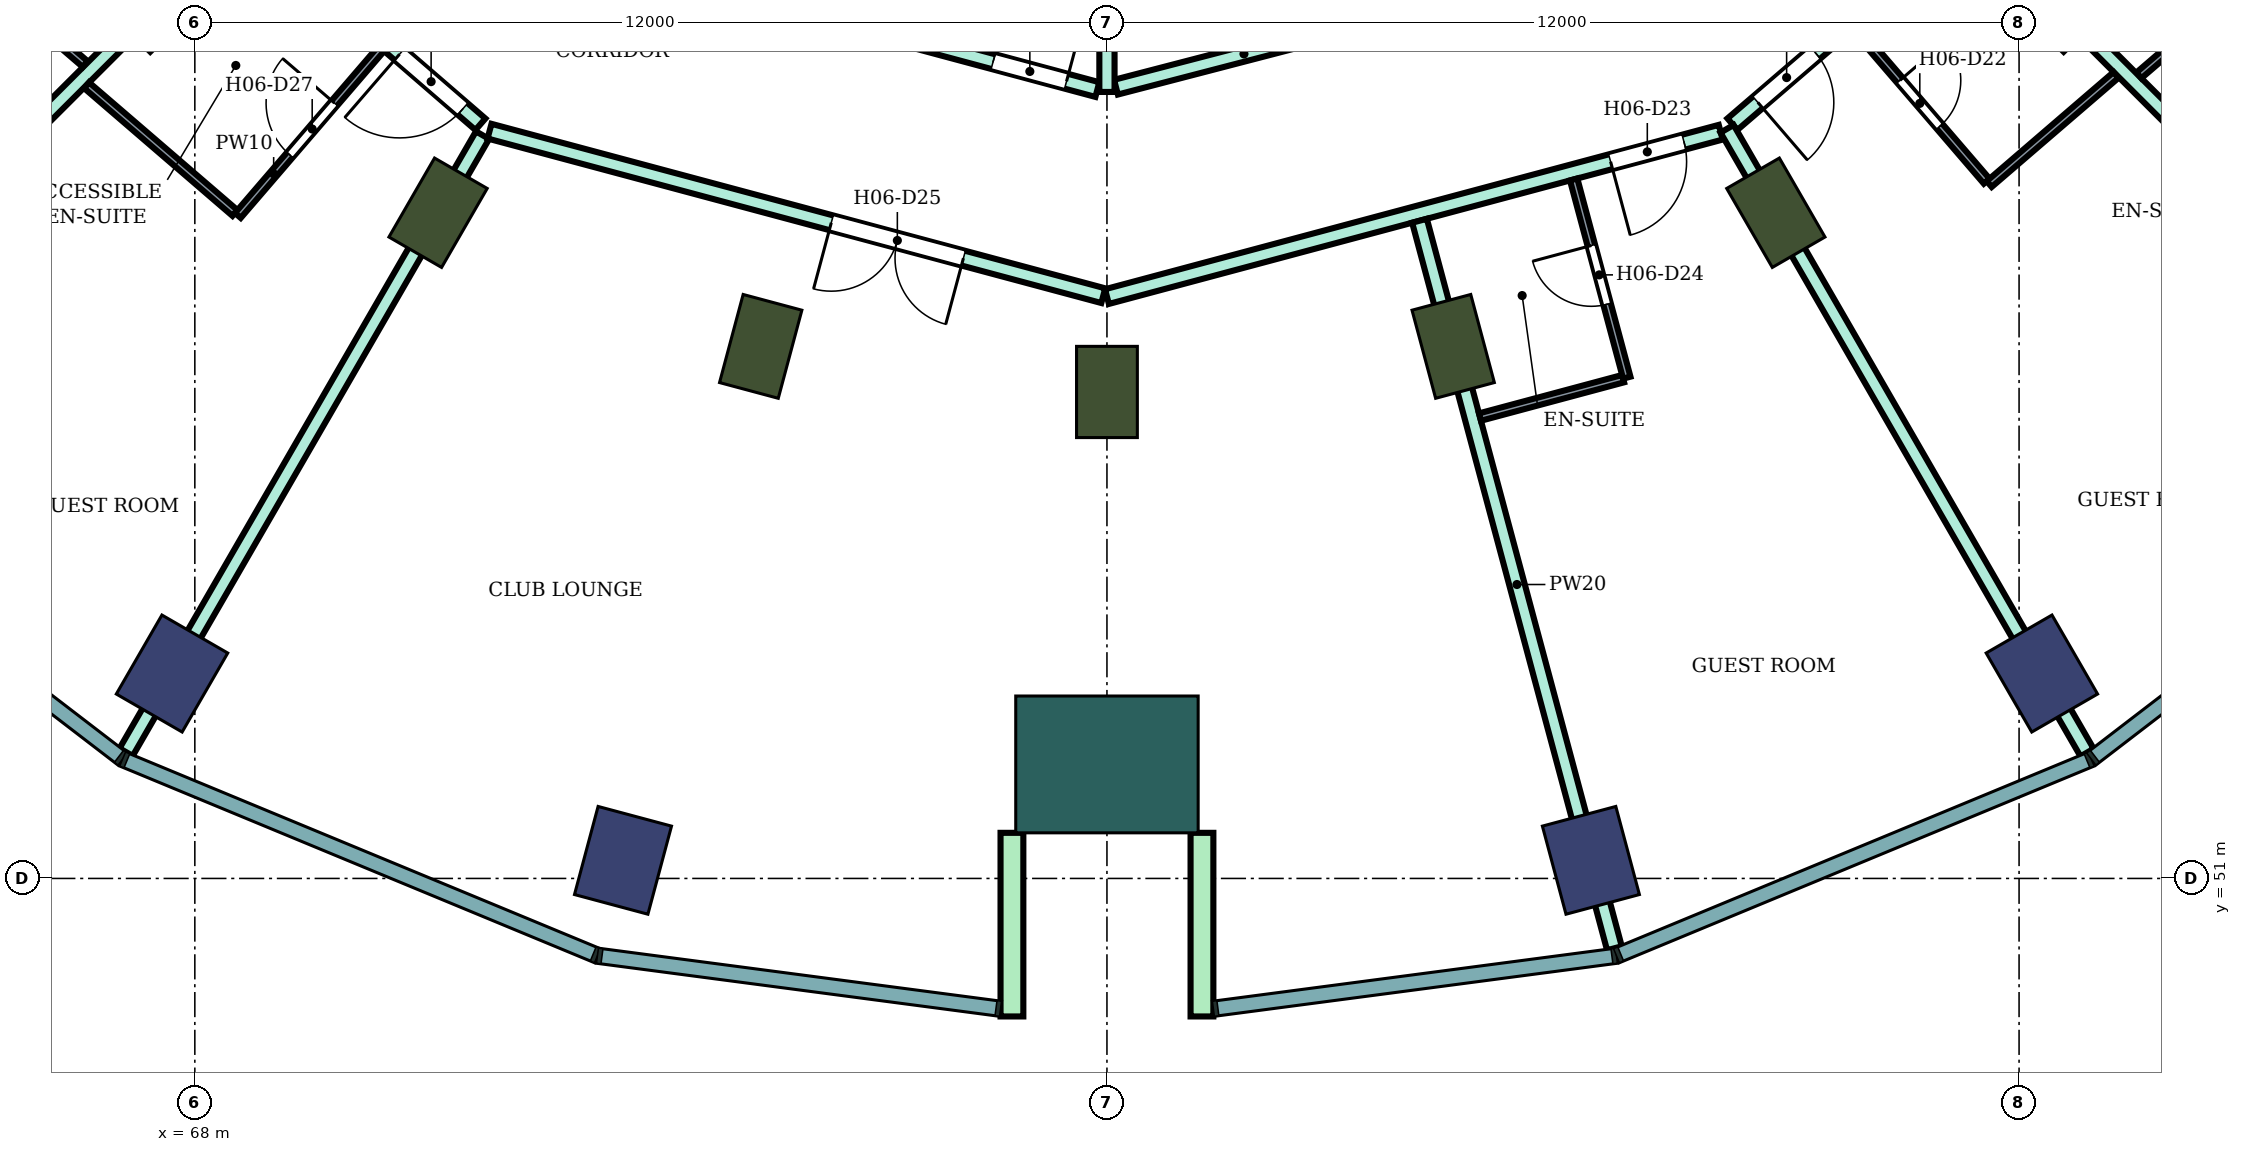
"""IFC4 building model, lengths in metres.
Left out: names, types, materials, properties, quantities, classifications, styles, units other than length and angle.
Written with IfcOpenShell. Run it as: python <this file> out.ifc"""

import sys

from ifc_helpers import new_model, si_unit, direction, frame, frame_2d, origin, origin_2d, place, context, subcontext, project, spatial, rectangle, extrude, element, fill, save


model = new_model("IFC4")
c1 = context("Model", 3, precision=1e-05, world=origin(), true_north=direction((0.0, 1.0)))
c2 = subcontext(c1, "Body", "Model", "MODEL_VIEW")
j1 = project(units=[si_unit("LENGTHUNIT", "METRE"), si_unit("PLANEANGLEUNIT", "RADIAN")], contexts=[c1])
p1 = place(None, origin())
s1 = spatial("IfcSite", under=j1, at=p1, CompositionType="ELEMENT")
p2 = place(p1, origin())
s2 = spatial("IfcBuilding", under=s1, at=p2, CompositionType="ELEMENT")
p3 = place(p2, frame((0.0, 0.0, 101.4)))
s3 = spatial("IfcBuildingStorey", under=s2, at=p3, CompositionType="ELEMENT", Elevation=101.4)
for number, where, z_axis, x_axis in (
    (1, (67.7, 53.696, 0.0), (0.0, 0.0, 1.0), (-0.5, -0.866, 0.0)),
    (2, (73.633, 51.238, 0.0), (0.0, 0.0, 1.0), (-0.259, -0.966, 0.0)),
    (3, (86.367, 51.238, 0.0), (0.0, 0.0, 1.0), (0.259, -0.966, 0.0)),
    (4, (92.3, 53.696, 0.0), (0.0, 0.0, 1.0), (0.5, -0.866, 0.0)),
):
    element("IfcColumn", number, at=place(p3, frame(where, z_axis=z_axis, x_axis=x_axis)), inside=s3, PredefinedType="COLUMN", context=c2, shape_type="SweptSolid", body=[
        extrude(rectangle(XDim=1.2, YDim=1.0, at=origin_2d()), origin(), (0.0, 0.0, 1.0), 3.8),
    ])
for number, where, z_axis, x_axis in (
    (5, (67.555, 62.555, 0.0), (0.0, 0.0, 1.0), (-0.707, -0.707, 0.0)),
    (6, (71.2, 59.758, 0.0), (0.0, 0.0, 1.0), (-0.5, -0.866, 0.0)),
    (7, (75.445, 58.0, 0.0), (0.0, 0.0, 1.0), (-0.259, -0.966, 0.0)),
    (8, (80.0, 57.4, 0.0), (0.0, 0.0, 1.0), (0.0, -1.0, 0.0)),
    (9, (84.555, 58.0, 0.0), (0.0, 0.0, 1.0), (0.259, -0.966, 0.0)),
    (10, (88.8, 59.758, 0.0), (0.0, 0.0, 1.0), (0.5, -0.866, 0.0)),
    (11, (92.445, 62.555, 0.0), (0.0, 0.0, 1.0), (0.707, -0.707, 0.0)),
):
    element("IfcColumn", number, at=place(p3, frame(where, z_axis=z_axis, x_axis=x_axis)), inside=s3, PredefinedType="COLUMN", context=c2, shape_type="SweptSolid", body=[
        extrude(rectangle(XDim=1.2, YDim=0.8, at=origin_2d()), origin(), (0.0, 0.0, 1.0), 3.8),
    ])
p4 = place(p3, frame((80.0, 52.5, 0.0), z_axis=(0.0, 0.0, 1.0), x_axis=(0.0, -1.0, 0.0)))
e12 = element("IfcColumn", 12, at=p4, inside=s3, PredefinedType="COLUMN", context=c2, shape_type="SweptSolid", body=[
    extrude(rectangle(XDim=1.8, YDim=2.4, at=origin_2d()), origin(), (0.0, 0.0, 1.0), 3.8),
])
for number, where, z_axis, x_axis in (
    (13, (78.75, 51.6, 0.0), (0.0, 0.0, 1.0), (0.0, -1.0, 0.0)),
    (14, (81.25, 51.6, 0.0), (0.0, 0.0, 1.0), (0.0, -1.0, 0.0)),
):
    element("IfcWall", number, at=place(p3, frame(where, z_axis=z_axis, x_axis=x_axis)), inside=s3, PredefinedType="NOTDEFINED", context=c2, shape_type="SweptSolid", body=[
        extrude(rectangle(XDim=2.416, YDim=0.3, at=frame_2d((1.208, 0.0))), origin(), (0.0, 0.0, 1.0), 3.8),
    ])
p5 = place(p3, frame((63.594, 58.598, 0.0), z_axis=(0.0, 0.0, 1.0), x_axis=(0.707228748718, 0.706984792613, 0.0)))
e15 = element("IfcWall", 15, at=p5, inside=s3, PredefinedType="PARTITIONING", context=c2, shape_type="SweptSolid", body=[
    extrude(rectangle(XDim=7.005, YDim=0.2, at=frame_2d((3.503, 0.0))), origin(), (0.0, 0.0, 1.0), 3.35),
])
p6 = place(p3, frame((67.079, 64.968, 0.0), z_axis=(0.0, 0.0, 1.0), x_axis=(0.756371089567, -0.654142778656, 0.0)))
e16 = element("IfcWall", 16, at=p6, inside=s3, PredefinedType="PARTITIONING", context=c2, shape_type="SweptSolid", body=[
    extrude(rectangle(XDim=6.185, YDim=0.2, at=frame_2d((3.093, 0.0))), origin(), (0.0, 0.0, 1.0), 3.35),
])
p7 = place(p6, frame((4.778, 0.0, 0.0)))
e17 = element("IfcOpeningElement", 17, at=p7, cuts=e16, PredefinedType="OPENING", context=c2, shape_type="SweptSolid", body=[
    extrude(rectangle(XDim=1.1, YDim=2.1, at=frame_2d((0.55, 1.05))), frame((0.0, 0.11, 0.0), z_axis=(0.0, -1.0, 0.0), x_axis=(1.0, 0.0, 0.0)), (0.0, 0.0, 1.0), 0.22),
])
p8 = place(p3, frame((67.096, 52.662, 0.0), z_axis=(0.0, 0.0, 1.0), x_axis=(0.500222922337, 0.865896661253, 0.0)))
e18 = element("IfcWall", 18, at=p8, inside=s3, PredefinedType="PARTITIONING", context=c2, shape_type="SweptSolid", body=[
    extrude(rectangle(XDim=9.374, YDim=0.2, at=frame_2d((4.687, 0.0))), origin(), (0.0, 0.0, 1.0), 3.35),
])
p9 = place(p3, frame((71.877, 60.831, 0.0), z_axis=(0.0, 0.0, 1.0), x_axis=(0.965905026676, -0.258896657842, 0.0)))
e19 = element("IfcWall", 19, at=p9, inside=s3, PredefinedType="PARTITIONING", context=c2, shape_type="SweptSolid", body=[
    extrude(rectangle(XDim=8.36, YDim=0.2, at=frame_2d((4.18, 0.0))), origin(), (0.0, 0.0, 1.0), 3.35),
])
p10 = place(p9, frame((4.655, 0.0, 0.0)))
e20 = element("IfcOpeningElement", 20, at=p10, cuts=e19, PredefinedType="OPENING", context=c2, shape_type="SweptSolid", body=[
    extrude(rectangle(XDim=1.8, YDim=2.1, at=frame_2d((0.9, 1.05))), frame((0.0, 0.11, 0.0), z_axis=(0.0, -1.0, 0.0), x_axis=(1.0, 0.0, 0.0)), (0.0, 0.0, 1.0), 0.22),
])
p11 = place(p3, frame((73.297, 63.143, 0.0), z_axis=(0.0, 0.0, 1.0), x_axis=(0.965859030528, -0.25906820173, 0.0)))
e21 = element("IfcWall", 21, at=p11, inside=s3, PredefinedType="PARTITIONING", context=c2, shape_type="SweptSolid", body=[
    extrude(rectangle(XDim=6.81, YDim=0.2, at=frame_2d((3.405, 0.0))), origin(), (0.0, 0.0, 1.0), 3.35),
])
p12 = place(p11, frame((5.39, 0.0, 0.0)))
e22 = element("IfcOpeningElement", 22, at=p12, cuts=e21, PredefinedType="OPENING", context=c2, shape_type="SweptSolid", body=[
    extrude(rectangle(XDim=1.0, YDim=2.1, at=frame_2d((0.5, 1.05))), frame((0.0, 0.11, 0.0), z_axis=(0.0, -1.0, 0.0), x_axis=(1.0, 0.0, 0.0)), (0.0, 0.0, 1.0), 0.22),
])
p13 = place(p3, frame((80.119, 61.41, 0.0), z_axis=(0.0, 0.0, 1.0), x_axis=(0.967823361235, 0.251630565408, 0.0)))
e23 = element("IfcWall", 23, at=p13, inside=s3, PredefinedType="PARTITIONING", context=c2, shape_type="SweptSolid", body=[
    extrude(rectangle(XDim=6.958, YDim=0.2, at=frame_2d((3.479, 0.0))), origin(), (0.0, 0.0, 1.0), 3.35),
])
p14 = place(p13, frame((2.529, 0.0, 0.0)))
e24 = element("IfcOpeningElement", 24, at=p14, cuts=e23, PredefinedType="OPENING", context=c2, shape_type="SweptSolid", body=[
    extrude(rectangle(XDim=1.8, YDim=2.1, at=frame_2d((0.9, 1.05))), frame((0.0, 0.11, 0.0), z_axis=(0.0, -1.0, 0.0), x_axis=(1.0, 0.0, 0.0)), (0.0, 0.0, 1.0), 0.22),
])
p15 = place(p3, frame((80.0, 58.655, 0.0), z_axis=(0.0, 0.0, 1.0), x_axis=(0.965967338894, 0.258664068224, 0.0)))
e25 = element("IfcWall", 25, at=p15, inside=s3, PredefinedType="PARTITIONING", context=c2, shape_type="SweptSolid", body=[
    extrude(rectangle(XDim=8.36, YDim=0.2, at=frame_2d((4.18, 0.0))), origin(), (0.0, 0.0, 1.0), 3.35),
])
p16 = place(p15, frame((6.86, 0.0, 0.0)))
e26 = element("IfcOpeningElement", 26, at=p16, cuts=e25, PredefinedType="OPENING", context=c2, shape_type="SweptSolid", body=[
    extrude(rectangle(XDim=1.0, YDim=2.1, at=frame_2d((0.5, 1.05))), frame((0.0, 0.11, 0.0), z_axis=(0.0, -1.0, 0.0), x_axis=(1.0, 0.0, 0.0)), (0.0, 0.0, 1.0), 0.22),
])
p17 = place(p3, frame((80.0, 61.347, 0.0), z_axis=(0.0, 0.0, 1.0), x_axis=(0.0, 1.0, 0.0)))
e27 = element("IfcWall", 27, at=p17, inside=s3, PredefinedType="PARTITIONING", context=c2, shape_type="SweptSolid", body=[
    extrude(rectangle(XDim=5.953, YDim=0.2, at=frame_2d((2.977, 0.0))), origin(), (0.0, 0.0, 1.0), 3.35),
])
p18 = place(p3, frame((84.112, 59.652, 0.0), z_axis=(0.0, 0.0, 1.0), x_axis=(0.258792739659, -0.965932874428, 0.0)))
e28 = element("IfcWall", 28, at=p18, inside=s3, PredefinedType="PARTITIONING", context=c2, shape_type="SweptSolid", body=[
    extrude(rectangle(XDim=9.908, YDim=0.2, at=frame_2d((4.954, 0.0))), origin(), (0.0, 0.0, 1.0), 3.35),
])
p19 = place(p3, frame((88.229, 60.923, 0.0), z_axis=(0.0, 0.0, 1.0), x_axis=(0.758220952094, 0.651997690031, 0.0)))
e29 = element("IfcWall", 29, at=p19, inside=s3, PredefinedType="PARTITIONING", context=c2, shape_type="SweptSolid", body=[
    extrude(rectangle(XDim=6.346, YDim=0.2, at=frame_2d((3.173, 0.0))), origin(), (0.0, 0.0, 1.0), 3.35),
])
p20 = place(p19, frame((4.767, 0.0, 0.0)))
e30 = element("IfcOpeningElement", 30, at=p20, cuts=e29, PredefinedType="OPENING", context=c2, shape_type="SweptSolid", body=[
    extrude(rectangle(XDim=1.0, YDim=2.1, at=frame_2d((0.5, 1.05))), frame((0.0, 0.11, 0.0), z_axis=(0.0, -1.0, 0.0), x_axis=(1.0, 0.0, 0.0)), (0.0, 0.0, 1.0), 0.22),
])
p21 = place(p19, frame((0.44, 0.0, 0.0)))
e31 = element("IfcOpeningElement", 31, at=p21, cuts=e29, PredefinedType="OPENING", context=c2, shape_type="SweptSolid", body=[
    extrude(rectangle(XDim=1.0, YDim=2.1, at=frame_2d((0.5, 1.05))), frame((0.0, 0.11, 0.0), z_axis=(0.0, -1.0, 0.0), x_axis=(1.0, 0.0, 0.0)), (0.0, 0.0, 1.0), 0.22),
])
p22 = place(p3, frame((88.158, 60.862, 0.0), z_axis=(0.0, 0.0, 1.0), x_axis=(0.499916512745, -0.866073599808, 0.0)))
e32 = element("IfcWall", 32, at=p22, inside=s3, PredefinedType="PARTITIONING", context=c2, shape_type="SweptSolid", body=[
    extrude(rectangle(XDim=9.475, YDim=0.2, at=frame_2d((4.737, 0.0))), origin(), (0.0, 0.0, 1.0), 3.35),
])
p23 = place(p3, frame((91.448, 63.547, 0.0), z_axis=(0.0, 0.0, 1.0), x_axis=(0.706949958062, -0.707263569538, 0.0)))
e33 = element("IfcWall", 33, at=p23, inside=s3, PredefinedType="PARTITIONING", context=c2, shape_type="SweptSolid", body=[
    extrude(rectangle(XDim=7.006, YDim=0.2, at=frame_2d((3.503, 0.0))), origin(), (0.0, 0.0, 1.0), 3.35),
])
p24 = place(p3, frame((65.246, 62.842, 0.0), z_axis=(0.0, 0.0, 1.0), x_axis=(0.758030338995, -0.652219292234, 0.0)))
e34 = element("IfcWall", 34, at=p24, inside=s3, PredefinedType="PARTITIONING", context=c2, shape_type="SweptSolid", body=[
    extrude(rectangle(XDim=1.73, YDim=0.1, at=frame_2d((0.865, 0.0))), origin(), (0.0, 0.0, 1.0), 3.35),
])
p25 = place(p3, frame((66.576, 61.435, 0.0), z_axis=(0.0, 0.0, 1.0), x_axis=(0.757970550281, -0.652288774169, 0.0)))
e35 = element("IfcWall", 35, at=p25, inside=s3, PredefinedType="PARTITIONING", context=c2, shape_type="SweptSolid", body=[
    extrude(rectangle(XDim=2.576, YDim=0.1, at=frame_2d((1.288, 0.0))), origin(), (0.0, 0.0, 1.0), 3.35),
])
p26 = place(p3, frame((68.566, 59.722, 0.0), z_axis=(0.0, 0.0, 1.0), x_axis=(0.65193146671, 0.758277892803, 0.0)))
e36 = element("IfcWall", 36, at=p26, inside=s3, PredefinedType="PARTITIONING", context=c2, shape_type="SweptSolid", body=[
    extrude(rectangle(XDim=2.89, YDim=0.1, at=frame_2d((1.445, 0.0))), origin(), (0.0, 0.0, 1.0), 3.35),
])
p27 = place(p26, frame((1.05, 0.0, 0.0)))
e37 = element("IfcOpeningElement", 37, at=p27, cuts=e36, PredefinedType="OPENING", context=c2, shape_type="SweptSolid", body=[
    extrude(rectangle(XDim=0.9, YDim=2.1, at=frame_2d((0.45, 1.05))), frame((0.0, 0.06, 0.0), z_axis=(0.0, -1.0, 0.0), x_axis=(1.0, 0.0, 0.0)), (0.0, 0.0, 1.0), 0.12),
])
p28 = place(p3, frame((84.908, 57.07, 0.0), z_axis=(0.0, 0.0, 1.0), x_axis=(0.965853538138, 0.25908867761, 0.0)))
e38 = element("IfcWall", 38, at=p28, inside=s3, PredefinedType="PARTITIONING", context=c2, shape_type="SweptSolid", body=[
    extrude(rectangle(XDim=1.95, YDim=0.1, at=frame_2d((0.975, 0.0))), origin(), (0.0, 0.0, 1.0), 3.35),
])
p29 = place(p3, frame((86.14, 60.196, 0.0), z_axis=(0.0, 0.0, 1.0), x_axis=(0.258945475746, -0.965891940432, 0.0)))
e39 = element("IfcWall", 39, at=p29, inside=s3, PredefinedType="PARTITIONING", context=c2, shape_type="SweptSolid", body=[
    extrude(rectangle(XDim=2.7, YDim=0.1, at=frame_2d((1.35, 0.0))), origin(), (0.0, 0.0, 1.0), 3.35),
])
p30 = place(p29, frame((0.9, 0.0, 0.0)))
e40 = element("IfcOpeningElement", 40, at=p30, cuts=e39, PredefinedType="OPENING", context=c2, shape_type="SweptSolid", body=[
    extrude(rectangle(XDim=0.8, YDim=2.1, at=frame_2d((0.4, 1.05))), frame((0.0, 0.06, 0.0), z_axis=(0.0, -1.0, 0.0), x_axis=(1.0, 0.0, 0.0)), (0.0, 0.0, 1.0), 0.12),
])
p31 = place(p3, frame((89.846, 62.182, 0.0), z_axis=(0.0, 0.0, 1.0), x_axis=(0.652095405055, -0.758136915541, 0.0)))
e41 = element("IfcWall", 41, at=p31, inside=s3, PredefinedType="PARTITIONING", context=c2, shape_type="SweptSolid", body=[
    extrude(rectangle(XDim=2.65, YDim=0.1, at=frame_2d((1.325, 0.0))), origin(), (0.0, 0.0, 1.0), 3.35),
])
p32 = place(p31, frame((0.9, 0.0, 0.0)))
e42 = element("IfcOpeningElement", 42, at=p32, cuts=e41, PredefinedType="OPENING", context=c2, shape_type="SweptSolid", body=[
    extrude(rectangle(XDim=0.8, YDim=2.1, at=frame_2d((0.4, 1.05))), frame((0.0, 0.06, 0.0), z_axis=(0.0, -1.0, 0.0), x_axis=(1.0, 0.0, 0.0)), (0.0, 0.0, 1.0), 0.12),
])
p33 = place(p3, frame((91.607, 60.135, 0.0), z_axis=(0.0, 0.0, 1.0), x_axis=(0.758135842672, 0.652096652388, 0.0)))
e43 = element("IfcWall", 43, at=p33, inside=s3, PredefinedType="PARTITIONING", context=c2, shape_type="SweptSolid", body=[
    extrude(rectangle(XDim=2.201, YDim=0.1, at=frame_2d((1.101, 0.0))), origin(), (0.0, 0.0, 1.0), 3.35),
])
p34 = place(p3, frame((93.577, 61.565, 0.0), z_axis=(0.0, 0.0, 1.0), x_axis=(0.75812140399, 0.652113438607, 0.0)))
e44 = element("IfcWall", 44, at=p34, inside=s3, PredefinedType="PARTITIONING", context=c2, shape_type="SweptSolid", body=[
    extrude(rectangle(XDim=7.72, YDim=0.1, at=frame_2d((3.86, 0.0))), origin(), (0.0, 0.0, 1.0), 3.35),
])
p35 = place(p34, frame((4.35, 0.0, 0.0)))
e45 = element("IfcOpeningElement", 45, at=p35, cuts=e44, PredefinedType="OPENING", context=c2, shape_type="SweptSolid", body=[
    extrude(rectangle(XDim=0.9, YDim=2.1, at=frame_2d((0.45, 1.05))), frame((0.0, 0.06, 0.0), z_axis=(0.0, -1.0, 0.0), x_axis=(1.0, 0.0, 0.0)), (0.0, 0.0, 1.0), 0.12),
])
p36 = place(p21, frame((1.0, 0.0, 0.0), z_axis=(0.0, 0.0, 1.0), x_axis=(-1.0, 0.0, 0.0)))
e46 = element("IfcDoor", 46, at=p36, inside=s3, OperationType="SINGLE_SWING_RIGHT", PredefinedType="DOOR", context=c2, shape_type="SweptSolid", body=[
    extrude(rectangle(XDim=1.0, YDim=2.1, at=frame_2d((0.5, 1.05))), frame((0.0, 0.025, 0.0), z_axis=(0.0, -1.0, 0.0), x_axis=(1.0, 0.0, 0.0)), (0.0, 0.0, 1.0), 0.05),
])
fill(e31, e46)
p37 = place(p32, origin())
e47 = element("IfcDoor", 47, at=p37, inside=s3, OperationType="SINGLE_SWING_LEFT", PredefinedType="DOOR", context=c2, shape_type="SweptSolid", body=[
    extrude(rectangle(XDim=0.8, YDim=2.1, at=frame_2d((0.4, 1.05))), frame((0.0, 0.025, 0.0), z_axis=(0.0, -1.0, 0.0), x_axis=(1.0, 0.0, 0.0)), (0.0, 0.0, 1.0), 0.05),
])
fill(e42, e47)
p38 = place(p16, frame((1.0, 0.0, 0.0), z_axis=(0.0, 0.0, 1.0), x_axis=(-1.0, 0.0, 0.0)))
e48 = element("IfcDoor", 48, at=p38, inside=s3, OperationType="SINGLE_SWING_RIGHT", PredefinedType="DOOR", context=c2, shape_type="SweptSolid", body=[
    extrude(rectangle(XDim=1.0, YDim=2.1, at=frame_2d((0.5, 1.05))), frame((0.0, 0.025, 0.0), z_axis=(0.0, -1.0, 0.0), x_axis=(1.0, 0.0, 0.0)), (0.0, 0.0, 1.0), 0.05),
])
fill(e26, e48)
p39 = place(p30, frame((0.8, 0.0, 0.0), z_axis=(0.0, 0.0, 1.0), x_axis=(-1.0, 0.0, 0.0)))
e49 = element("IfcDoor", 49, at=p39, inside=s3, OperationType="SINGLE_SWING_RIGHT", PredefinedType="DOOR", context=c2, shape_type="SweptSolid", body=[
    extrude(rectangle(XDim=0.8, YDim=2.1, at=frame_2d((0.4, 1.05))), frame((0.0, 0.025, 0.0), z_axis=(0.0, -1.0, 0.0), x_axis=(1.0, 0.0, 0.0)), (0.0, 0.0, 1.0), 0.05),
])
fill(e40, e49)
p40 = place(p10, frame((1.8, 0.0, 0.0), z_axis=(0.0, 0.0, 1.0), x_axis=(-1.0, 0.0, 0.0)))
e50 = element("IfcDoor", 50, at=p40, inside=s3, OperationType="DOUBLE_DOOR_SINGLE_SWING", PredefinedType="DOOR", context=c2, shape_type="SweptSolid", body=[
    extrude(rectangle(XDim=1.8, YDim=2.1, at=frame_2d((0.9, 1.05))), frame((0.0, 0.025, 0.0), z_axis=(0.0, -1.0, 0.0), x_axis=(1.0, 0.0, 0.0)), (0.0, 0.0, 1.0), 0.05),
])
fill(e20, e50)
p41 = place(p7, frame((1.1, 0.0, 0.0), z_axis=(0.0, 0.0, 1.0), x_axis=(-1.0, 0.0, 0.0)))
e51 = element("IfcDoor", 51, at=p41, inside=s3, OperationType="SINGLE_SWING_RIGHT", PredefinedType="DOOR", context=c2, shape_type="SweptSolid", body=[
    extrude(rectangle(XDim=1.1, YDim=2.1, at=frame_2d((0.55, 1.05))), frame((0.0, 0.025, 0.0), z_axis=(0.0, -1.0, 0.0), x_axis=(1.0, 0.0, 0.0)), (0.0, 0.0, 1.0), 0.05),
])
fill(e17, e51)
p42 = place(p27, origin())
e52 = element("IfcDoor", 52, at=p42, inside=s3, OperationType="SINGLE_SWING_RIGHT", PredefinedType="DOOR", context=c2, shape_type="SweptSolid", body=[
    extrude(rectangle(XDim=0.9, YDim=2.1, at=frame_2d((0.45, 1.05))), frame((0.0, 0.025, 0.0), z_axis=(0.0, -1.0, 0.0), x_axis=(1.0, 0.0, 0.0)), (0.0, 0.0, 1.0), 0.05),
])
fill(e37, e52)
p43 = place(p12, origin())
e53 = element("IfcDoor", 53, at=p43, inside=s3, OperationType="SINGLE_SWING_RIGHT", PredefinedType="DOOR", context=c2, shape_type="SweptSolid", body=[
    extrude(rectangle(XDim=1.0, YDim=2.1, at=frame_2d((0.5, 1.05))), frame((0.0, 0.025, 0.0), z_axis=(0.0, -1.0, 0.0), x_axis=(1.0, 0.0, 0.0)), (0.0, 0.0, 1.0), 0.05),
])
fill(e22, e53)
save(model, sys.argv[1])
